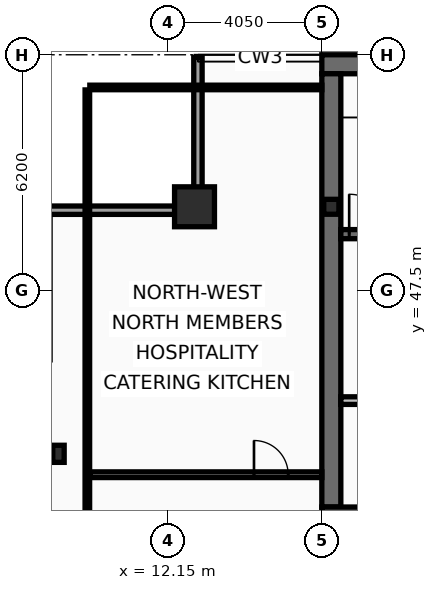
"""IFC4 building model, lengths in metres.
Left out: names, types, materials, properties, quantities, classifications, styles, units other than length and angle.
Written with IfcOpenShell. Run it as: python <this file> out.ifc"""

import sys

from ifc_helpers import new_model, si_unit, direction, frame, frame_2d, origin, origin_2d, place, context, subcontext, project, spatial, rectangle, hollow_rectangle, i_section, extrude, element, fill, save


model = new_model("IFC4")
c1 = context("Model", 3, precision=1e-05, world=origin(), true_north=direction((0.0, 1.0)))
c2 = subcontext(c1, "Body", "Model", "MODEL_VIEW")
j1 = project(units=[si_unit("LENGTHUNIT", "METRE"), si_unit("PLANEANGLEUNIT", "RADIAN")], contexts=[c1])
p1 = place(None, origin())
s1 = spatial("IfcSite", under=j1, at=p1, CompositionType="ELEMENT")
p2 = place(p1, origin())
s2 = spatial("IfcBuilding", under=s1, at=p2, CompositionType="ELEMENT")
p3 = place(p2, frame((0.0, 0.0, 277.0)))
s3 = spatial("IfcBuildingStorey", under=s2, at=p3, CompositionType="ELEMENT", Elevation=277.0)
p4 = place(p3, frame((16.2, 53.45, 0.0), z_axis=(0.0, 0.0, 1.0), x_axis=(1.0, 0.0, 0.0)))
e1 = element("IfcWall", 1, at=p4, inside=s3, PredefinedType="SHEAR", context=c2, shape_type="SweptSolid", body=[
    extrude(rectangle(XDim=40.5, YDim=0.5, at=frame_2d((20.25, 0.0))), origin(), (0.0, 0.0, 1.0), 3.44),
])
p5 = place(p3, frame((16.45, 41.8, 0.0), z_axis=(0.0, 0.0, 1.0), x_axis=(0.0, 1.0, 0.0)))
e2 = element("IfcWall", 2, at=p5, inside=s3, PredefinedType="SHEAR", context=c2, shape_type="SweptSolid", body=[
    extrude(rectangle(XDim=11.4, YDim=0.5, at=frame_2d((5.7, 0.0))), origin(), (0.0, 0.0, 1.0), 3.44),
])
p6 = place(p3, frame((18.65, 41.55, 0.0), z_axis=(0.0, 0.0, 1.0), x_axis=(-1.0, 0.0, 0.0)))
e3 = element("IfcWall", 3, at=p6, inside=s3, PredefinedType="SHEAR", context=c2, shape_type="SweptSolid", body=[
    extrude(rectangle(XDim=2.45, YDim=0.5, at=frame_2d((1.225, 0.0))), origin(), (0.0, 0.0, 1.0), 3.44),
])
p7 = place(p3, frame((16.7, 48.98, 0.0), z_axis=(0.0, 0.0, 1.0), x_axis=(1.0, 0.0, 0.0)))
e4 = element("IfcWall", 4, at=p7, inside=s3, PredefinedType="SHEAR", context=c2, shape_type="SweptSolid", body=[
    extrude(rectangle(XDim=7.52, YDim=0.24, at=frame_2d((3.76, 0.0))), origin(), (0.0, 0.0, 1.0), 3.44),
])
p8 = place(p7, frame((0.22, 0.0, 0.0)))
e5 = element("IfcOpeningElement", 5, at=p8, cuts=e4, PredefinedType="OPENING", context=c2, shape_type="SweptSolid", body=[
    extrude(rectangle(XDim=1.05, YDim=2.15, at=frame_2d((0.525, 1.075))), frame((0.0, 0.13, 0.0), z_axis=(0.0, -1.0, 0.0), x_axis=(1.0, 0.0, 0.0)), (0.0, 0.0, 1.0), 0.26),
])
p9 = place(p3, frame((12.85, 49.7, 0.0), z_axis=(0.0, 0.0, 1.0), x_axis=(1.0, 0.0, 0.0)))
e6 = element("IfcColumn", 6, at=p9, inside=s3, PredefinedType="COLUMN", context=c2, shape_type="SweptSolid", body=[
    extrude(hollow_rectangle(XDim=1.05, YDim=1.05, WallThickness=0.055, at=origin_2d()), origin(), (0.0, 0.0, 1.0), 3.6),
])
p10 = place(p3, frame((9.27, 43.2, 0.0), z_axis=(0.0, 0.0, 1.0), x_axis=(1.0, 0.0, 0.0)))
e7 = element("IfcColumn", 7, at=p10, inside=s3, PredefinedType="COLUMN", context=c2, shape_type="SweptSolid", body=[
    extrude(i_section(OverallWidth=0.3, OverallDepth=0.45, WebThickness=0.014, FlangeThickness=0.026, at=origin_2d()), origin(), (0.0, 0.0, 1.0), 3.6),
])
p11 = place(p3, frame((16.45, 49.7, 0.0), z_axis=(0.0, 0.0, 1.0), x_axis=(1.0, 0.0, 0.0)))
e8 = element("IfcColumn", 8, at=p11, inside=s3, PredefinedType="COLUMN", context=c2, shape_type="SweptSolid", body=[
    extrude(i_section(OverallWidth=0.399, OverallDepth=0.393, WebThickness=0.023, FlangeThickness=0.037, at=origin_2d()), origin(), (0.0, 0.0, 1.0), 3.6),
])
p12 = place(p3, frame((8.83, 49.61, 0.0), z_axis=(0.0, 0.0, 1.0), x_axis=(1.0, 0.0, 0.0)))
e9 = element("IfcWall", 9, at=p12, inside=s3, PredefinedType="SOLIDWALL", context=c2, shape_type="SweptSolid", body=[
    extrude(rectangle(XDim=4.22, YDim=0.22, at=frame_2d((2.11, 0.0))), origin(), (0.0, 0.0, 1.0), 2.88),
])
p13 = place(p3, frame((12.94, 49.72, 0.0), z_axis=(0.0, 0.0, 1.0), x_axis=(0.0, 1.0, 0.0)))
e10 = element("IfcWall", 10, at=p13, inside=s3, PredefinedType="SOLIDWALL", context=c2, shape_type="SweptSolid", body=[
    extrude(rectangle(XDim=3.91, YDim=0.22, at=frame_2d((1.955, 0.0))), origin(), (0.0, 0.0, 1.0), 2.88),
])
p14 = place(p3, frame((16.7, 44.6, 0.0), z_axis=(0.0, 0.0, 1.0), x_axis=(1.0, 0.0, 0.0)))
e11 = element("IfcWall", 11, at=p14, inside=s3, PredefinedType="PARTITIONING", context=c2, shape_type="SweptSolid", body=[
    extrude(rectangle(XDim=4.3, YDim=0.2, at=frame_2d((2.15, 0.0))), origin(), (0.0, 0.0, 1.0), 3.44),
])
p15 = place(p14, frame((1.25, 0.0, 0.0)))
e12 = element("IfcOpeningElement", 12, at=p15, cuts=e11, PredefinedType="OPENING", context=c2, shape_type="SweptSolid", body=[
    extrude(rectangle(XDim=1.05, YDim=2.15, at=frame_2d((0.525, 1.075))), frame((0.0, 0.11, 0.0), z_axis=(0.0, -1.0, 0.0), x_axis=(1.0, 0.0, 0.0)), (0.0, 0.0, 1.0), 0.22),
])
p16 = place(p3, frame((10.095, 42.65, 0.0), z_axis=(0.0, 0.0, 1.0), x_axis=(1.0, 0.0, 0.0)))
e13 = element("IfcWall", 13, at=p16, inside=s3, PredefinedType="PARTITIONING", context=c2, shape_type="SweptSolid", body=[
    extrude(rectangle(XDim=6.105, YDim=0.15, at=frame_2d((3.052, 0.0))), origin(), (0.0, 0.0, 1.0), 2.78),
])
p17 = place(p16, frame((4.32, 0.0, 0.0)))
e14 = element("IfcOpeningElement", 14, at=p17, cuts=e13, PredefinedType="OPENING", context=c2, shape_type="SweptSolid", body=[
    extrude(rectangle(XDim=0.9, YDim=2.05, at=frame_2d((0.45, 1.025))), frame((0.0, 0.085, 0.0), z_axis=(0.0, -1.0, 0.0), x_axis=(1.0, 0.0, 0.0)), (0.0, 0.0, 1.0), 0.17),
])
p18 = place(p3, frame((10.03, 10.665, 0.0), z_axis=(0.0, 0.0, 1.0), x_axis=(0.0, 1.0, 0.0)))
e15 = element("IfcWall", 15, at=p18, inside=s3, PredefinedType="PARTITIONING", context=c2, shape_type="SweptSolid", body=[
    extrude(rectangle(XDim=42.11, YDim=0.12, at=frame_2d((21.055, 0.0))), origin(), (0.0, 0.0, 1.0), 2.78),
])
p19 = place(p3, frame((10.095, 52.84, 0.0), z_axis=(0.0, 0.0, 1.0), x_axis=(1.0, 0.0, 0.0)))
e16 = element("IfcWall", 16, at=p19, inside=s3, PredefinedType="PARTITIONING", context=c2, shape_type="SweptSolid", body=[
    extrude(rectangle(XDim=6.105, YDim=0.12, at=frame_2d((3.052, 0.0))), origin(), (0.0, 0.0, 1.0), 3.44),
])
p20 = place(p8, origin())
e17 = element("IfcDoor", 17, at=p20, inside=s3, OperationType="SINGLE_SWING_LEFT", PredefinedType="DOOR", context=c2, shape_type="SweptSolid", body=[
    extrude(rectangle(XDim=1.05, YDim=2.15, at=frame_2d((0.525, 1.075))), frame((0.0, 0.025, 0.0), z_axis=(0.0, -1.0, 0.0), x_axis=(1.0, 0.0, 0.0)), (0.0, 0.0, 1.0), 0.05),
])
fill(e5, e17)
p21 = place(p17, origin())
e18 = element("IfcDoor", 18, at=p21, inside=s3, OperationType="SINGLE_SWING_LEFT", PredefinedType="DOOR", context=c2, shape_type="SweptSolid", body=[
    extrude(rectangle(XDim=0.9, YDim=2.05, at=frame_2d((0.45, 1.025))), frame((0.0, 0.025, 0.0), z_axis=(0.0, -1.0, 0.0), x_axis=(1.0, 0.0, 0.0)), (0.0, 0.0, 1.0), 0.05),
])
fill(e14, e18)
save(model, sys.argv[1])
